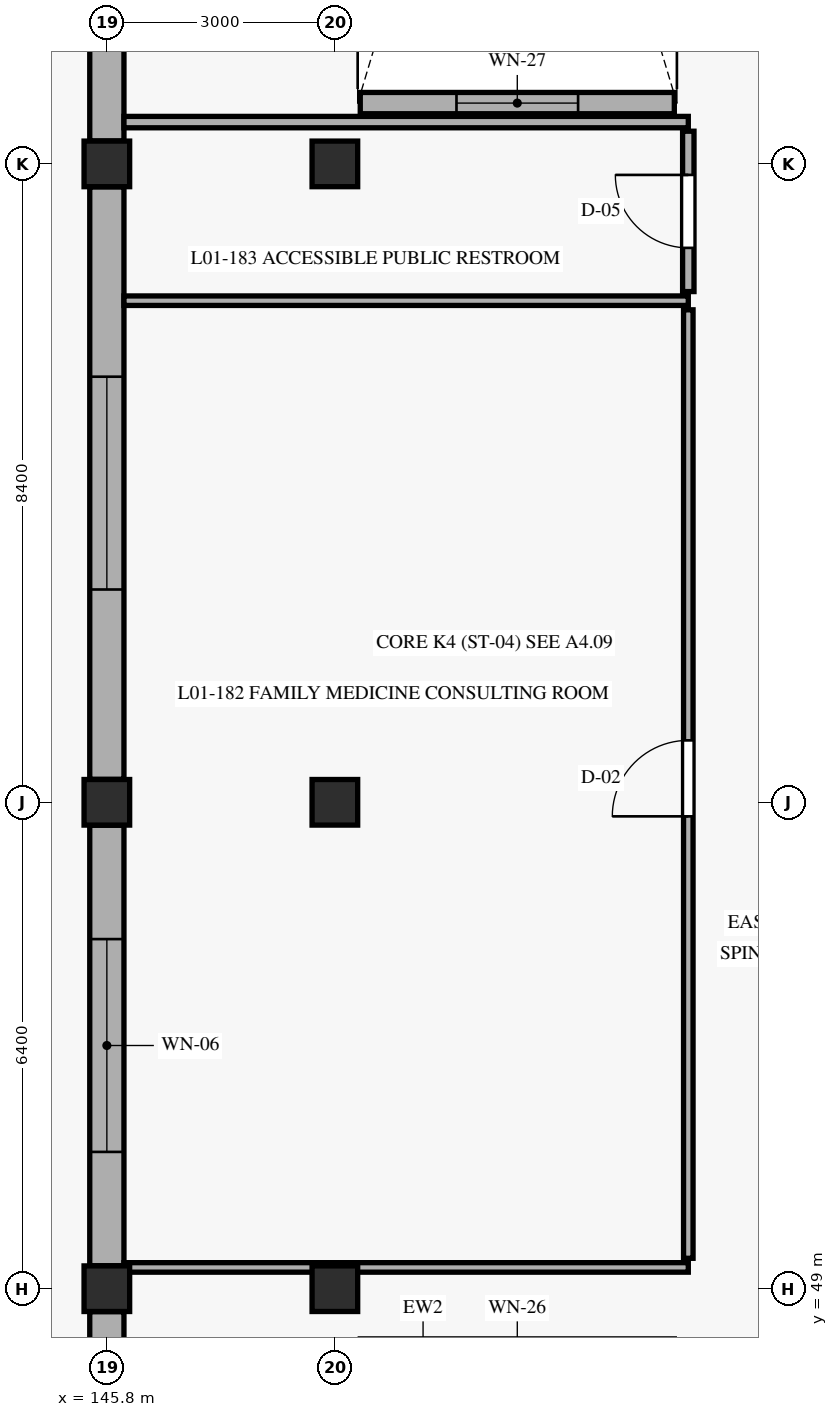
"""IFC4 building model, lengths in metres.
Left out: names, types, materials, properties, quantities, classifications, styles, units other than length and angle.
Written with IfcOpenShell. Run it as: python <this file> out.ifc"""

import sys

from ifc_helpers import new_model, si_unit, direction, frame, frame_2d, origin, origin_with_axes, origin_2d, place, context, subcontext, project, spatial, rectangle, extrude, element, fill, save


model = new_model("IFC4")
c1 = context("Model", 3, precision=1e-05, world=origin(), true_north=direction((0.0, 1.0)))
c2 = subcontext(c1, "Body", "Model", "MODEL_VIEW")
j1 = project(units=[si_unit("LENGTHUNIT", "METRE"), si_unit("PLANEANGLEUNIT", "RADIAN")], contexts=[c1])
p1 = place(None, origin())
s1 = spatial("IfcSite", under=j1, at=p1, CompositionType="ELEMENT")
p2 = place(p1, origin())
s2 = spatial("IfcBuilding", under=s1, at=p2, CompositionType="ELEMENT")
p3 = place(p2, origin())
s3 = spatial("IfcBuildingStorey", under=s2, at=p3, CompositionType="ELEMENT", Elevation=0.0)
for number, where, z_axis, x_axis in (
    (1, (145.8, 49.0, 0.0), (0.0, 0.0, 1.0), (1.0, 0.0, 0.0)),
    (2, (145.8, 55.4, 0.0), (0.0, 0.0, 1.0), (1.0, 0.0, 0.0)),
    (3, (145.8, 63.8, 0.0), (0.0, 0.0, 1.0), (1.0, 0.0, 0.0)),
    (4, (148.8, 49.0, 0.0), (0.0, 0.0, 1.0), (1.0, 0.0, 0.0)),
    (5, (148.8, 55.4, 0.0), (0.0, 0.0, 1.0), (1.0, 0.0, 0.0)),
    (6, (148.8, 63.8, 0.0), (0.0, 0.0, 1.0), (1.0, 0.0, 0.0)),
):
    element("IfcColumn", number, at=place(p3, frame(where, z_axis=z_axis, x_axis=x_axis)), inside=s3, PredefinedType="COLUMN", context=c2, shape_type="SweptSolid", body=[
        extrude(rectangle(XDim=0.6, YDim=0.6, at=origin_2d()), origin(), (0.0, 0.0, 1.0), 4.8),
    ])
p4 = place(p3, frame((145.8, 48.698, 0.0), z_axis=(0.0, 0.0, 1.0), x_axis=(0.0, -1.0, 0.0)))
e7 = element("IfcWall", 7, at=p4, inside=s3, PredefinedType="SOLIDWALL", context=c2, shape_type="SweptSolid", body=[
    extrude(rectangle(XDim=5.796, YDim=0.45, at=frame_2d((2.898, 0.0))), origin(), (0.0, 0.0, 1.0), 4.09),
])
p5 = place(p4, frame((1.968, 0.0, 0.0)))
e8 = element("IfcOpeningElement", 8, at=p5, cuts=e7, PredefinedType="OPENING", context=c2, shape_type="SweptSolid", body=[
    extrude(rectangle(XDim=1.86, YDim=2.5, at=frame_2d((0.93, 1.25))), frame((0.0, 0.235, 0.0), z_axis=(0.0, -1.0, 0.0), x_axis=(1.0, 0.0, 0.0)), (0.0, 0.0, 1.0), 0.47),
])
p6 = place(p3, frame((145.8, 55.098, 0.0), z_axis=(0.0, 0.0, 1.0), x_axis=(0.0, -1.0, 0.0)))
e9 = element("IfcWall", 9, at=p6, inside=s3, PredefinedType="SOLIDWALL", context=c2, shape_type="SweptSolid", body=[
    extrude(rectangle(XDim=5.796, YDim=0.45, at=frame_2d((2.898, 0.0))), origin(), (0.0, 0.0, 1.0), 4.04),
])
p7 = place(p6, frame((1.498, 0.0, 0.6)))
e10 = element("IfcOpeningElement", 10, at=p7, cuts=e9, PredefinedType="OPENING", context=c2, shape_type="SweptSolid", body=[
    extrude(rectangle(XDim=2.8, YDim=2.5, at=frame_2d((1.4, 1.25))), frame((0.0, 0.235, 0.0), z_axis=(0.0, -1.0, 0.0), x_axis=(1.0, 0.0, 0.0)), (0.0, 0.0, 1.0), 0.47),
])
p8 = place(p3, frame((145.8, 63.498, 0.0), z_axis=(0.0, 0.0, 1.0), x_axis=(0.0, -1.0, 0.0)))
e11 = element("IfcWall", 11, at=p8, inside=s3, PredefinedType="SOLIDWALL", context=c2, shape_type="SweptSolid", body=[
    extrude(rectangle(XDim=7.796, YDim=0.45, at=frame_2d((3.898, 0.0))), origin(), (0.0, 0.0, 1.0), 4.04),
])
p9 = place(p8, frame((2.498, 0.0, 0.6)))
e12 = element("IfcOpeningElement", 12, at=p9, cuts=e11, PredefinedType="OPENING", context=c2, shape_type="SweptSolid", body=[
    extrude(rectangle(XDim=2.8, YDim=2.5, at=frame_2d((1.4, 1.25))), frame((0.0, 0.235, 0.0), z_axis=(0.0, -1.0, 0.0), x_axis=(1.0, 0.0, 0.0)), (0.0, 0.0, 1.0), 0.47),
])
p10 = place(p3, frame((145.8, 71.898, 0.0), z_axis=(0.0, 0.0, 1.0), x_axis=(0.0, -1.0, 0.0)))
e13 = element("IfcWall", 13, at=p10, inside=s3, PredefinedType="SOLIDWALL", context=c2, shape_type="SweptSolid", body=[
    extrude(rectangle(XDim=7.796, YDim=0.45, at=frame_2d((3.898, 0.0))), origin(), (0.0, 0.0, 1.0), 4.04),
])
p11 = place(p10, frame((2.498, 0.0, 0.6)))
e14 = element("IfcOpeningElement", 14, at=p11, cuts=e13, PredefinedType="OPENING", context=c2, shape_type="SweptSolid", body=[
    extrude(rectangle(XDim=2.8, YDim=2.5, at=frame_2d((1.4, 1.25))), frame((0.0, 0.235, 0.0), z_axis=(0.0, -1.0, 0.0), x_axis=(1.0, 0.0, 0.0)), (0.0, 0.0, 1.0), 0.47),
])
p12 = place(p3, frame((153.266, 64.6, 0.0), z_axis=(0.0, 0.0, 1.0), x_axis=(-1.0, 0.0, 0.0)))
e15 = element("IfcWall", 15, at=p12, inside=s3, PredefinedType="SOLIDWALL", context=c2, shape_type="SweptSolid", body=[
    extrude(rectangle(XDim=4.132, YDim=0.28, at=frame_2d((2.066, 0.0))), origin(), (0.0, 0.0, 1.0), 4.5),
])
p13 = place(p12, frame((1.266, 0.0, 0.85)))
e16 = element("IfcOpeningElement", 16, at=p13, cuts=e15, PredefinedType="OPENING", context=c2, shape_type="SweptSolid", body=[
    extrude(rectangle(XDim=1.6, YDim=1.8, at=frame_2d((0.8, 0.9))), frame((0.0, 0.15, 0.0), z_axis=(0.0, -1.0, 0.0), x_axis=(1.0, 0.0, 0.0)), (0.0, 0.0, 1.0), 0.3),
])
p14 = place(p3, frame((153.45, 49.4, 0.0), z_axis=(0.0, 0.0, 1.0), x_axis=(0.0, 1.0, 0.0)))
e17 = element("IfcWall", 17, at=p14, inside=s3, PredefinedType="PARTITIONING", context=c2, shape_type="SweptSolid", body=[
    extrude(rectangle(XDim=12.48, YDim=0.125, at=frame_2d((6.24, 0.0))), origin(), (0.0, 0.0, 1.0), 4.095),
])
p15 = place(p14, frame((5.815, 0.0, 0.0)))
e18 = element("IfcOpeningElement", 18, at=p15, cuts=e17, PredefinedType="OPENING", context=c2, shape_type="SweptSolid", body=[
    extrude(rectangle(XDim=1.0, YDim=2.15, at=frame_2d((0.5, 1.075))), frame((0.0, 0.073, 0.0), z_axis=(0.0, -1.0, 0.0), x_axis=(1.0, 0.0, 0.0)), (0.0, 0.0, 1.0), 0.145),
])
for number, where, z_axis, x_axis in (
    (19, (146.025, 49.28, 0.0), (0.0, 0.0, 1.0), (1.0, 0.0, 0.0)),
    (20, (146.025, 62.0, 0.0), (0.0, 0.0, 1.0), (1.0, 0.0, 0.0)),
):
    element("IfcWall", number, at=place(p3, frame(where, z_axis=z_axis, x_axis=x_axis)), inside=s3, PredefinedType="PARTITIONING", context=c2, shape_type="SweptSolid", body=[
        extrude(rectangle(XDim=7.425, YDim=0.125, at=frame_2d((3.712, 0.0))), origin(), (0.0, 0.0, 1.0), 4.035),
    ])
p16 = place(p3, frame((153.45, 62.12, 0.0), z_axis=(0.0, 0.0, 1.0), x_axis=(0.0, 1.0, 0.0)))
e21 = element("IfcWall", 21, at=p16, inside=s3, PredefinedType="PARTITIONING", context=c2, shape_type="SweptSolid", body=[
    extrude(rectangle(XDim=2.11, YDim=0.15, at=frame_2d((1.055, 0.0))), origin(), (0.0, 0.0, 1.0), 4.095),
])
p17 = place(p16, frame((0.575, 0.0, 0.0)))
e22 = element("IfcOpeningElement", 22, at=p17, cuts=e21, PredefinedType="OPENING", context=c2, shape_type="SweptSolid", body=[
    extrude(rectangle(XDim=0.96, YDim=2.1, at=frame_2d((0.48, 1.05))), frame((0.0, 0.085, 0.0), z_axis=(0.0, -1.0, 0.0), x_axis=(1.0, 0.0, 0.0)), (0.0, 0.0, 1.0), 0.17),
])
p18 = place(p3, frame((146.025, 64.35, 0.0), z_axis=(0.0, 0.0, 1.0), x_axis=(1.0, 0.0, 0.0)))
e23 = element("IfcWall", 23, at=p18, inside=s3, PredefinedType="PARTITIONING", context=c2, shape_type="SweptSolid", body=[
    extrude(rectangle(XDim=7.425, YDim=0.15, at=frame_2d((3.712, 0.0))), origin(), (0.0, 0.0, 1.0), 4.035),
])
p19 = place(p7, origin_with_axes())
e24 = element("IfcWindow", 24, at=p19, inside=s3, PartitioningType="SINGLE_PANEL", PredefinedType="WINDOW", context=c2, shape_type="SweptSolid", body=[
    extrude(rectangle(XDim=2.8, YDim=2.5, at=frame_2d((1.4, 1.25))), frame((0.0, 0.03, 0.0), z_axis=(0.0, -1.0, 0.0), x_axis=(1.0, 0.0, 0.0)), (0.0, 0.0, 1.0), 0.06),
])
fill(e10, e24)
p20 = place(p9, origin_with_axes())
e25 = element("IfcWindow", 25, at=p20, inside=s3, PartitioningType="SINGLE_PANEL", PredefinedType="WINDOW", context=c2, shape_type="SweptSolid", body=[
    extrude(rectangle(XDim=2.8, YDim=2.5, at=frame_2d((1.4, 1.25))), frame((0.0, 0.03, 0.0), z_axis=(0.0, -1.0, 0.0), x_axis=(1.0, 0.0, 0.0)), (0.0, 0.0, 1.0), 0.06),
])
fill(e12, e25)
p21 = place(p13, origin_with_axes())
e26 = element("IfcWindow", 26, at=p21, inside=s3, PartitioningType="SINGLE_PANEL", PredefinedType="WINDOW", context=c2, shape_type="SweptSolid", body=[
    extrude(rectangle(XDim=1.6, YDim=1.8, at=frame_2d((0.8, 0.9))), frame((0.0, 0.03, 0.0), z_axis=(0.0, -1.0, 0.0), x_axis=(1.0, 0.0, 0.0)), (0.0, 0.0, 1.0), 0.06),
])
fill(e16, e26)
p22 = place(p15, origin_with_axes())
e27 = element("IfcDoor", 27, at=p22, inside=s3, OperationType="SINGLE_SWING_LEFT", PredefinedType="DOOR", context=c2, shape_type="SweptSolid", body=[
    extrude(rectangle(XDim=1.0, YDim=2.15, at=frame_2d((0.5, 1.075))), frame((0.0, 0.025, 0.0), z_axis=(0.0, -1.0, 0.0), x_axis=(1.0, 0.0, 0.0)), (0.0, 0.0, 1.0), 0.05),
])
fill(e18, e27)
p23 = place(p17, origin_with_axes())
e28 = element("IfcDoor", 28, at=p23, inside=s3, OperationType="SINGLE_SWING_RIGHT", PredefinedType="DOOR", context=c2, shape_type="SweptSolid", body=[
    extrude(rectangle(XDim=0.96, YDim=2.1, at=frame_2d((0.48, 1.05))), frame((0.0, 0.025, 0.0), z_axis=(0.0, -1.0, 0.0), x_axis=(1.0, 0.0, 0.0)), (0.0, 0.0, 1.0), 0.05),
])
fill(e22, e28)
save(model, sys.argv[1])
